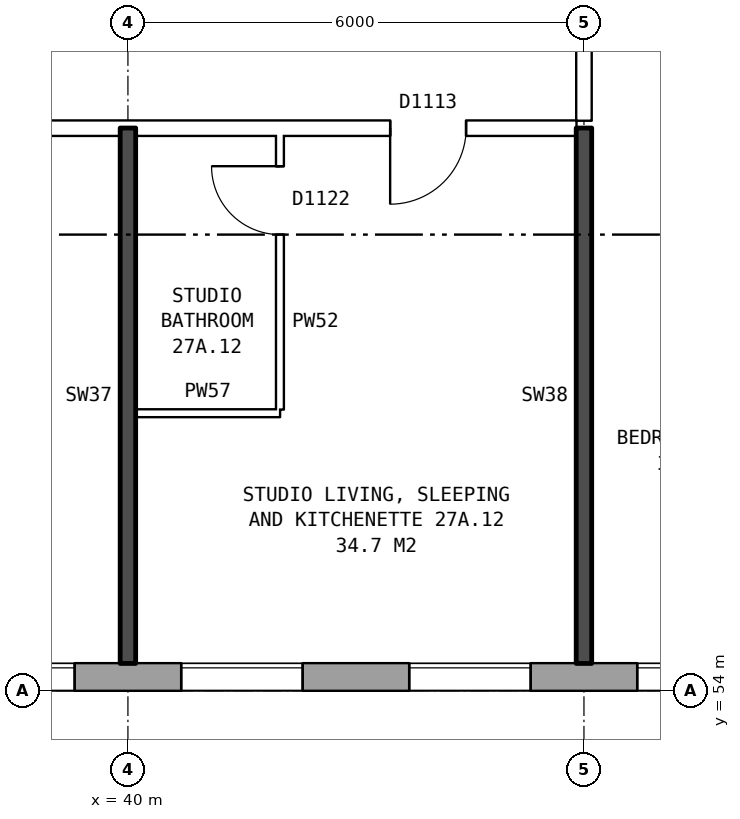
"""IFC4 building model, lengths in metres.
Left out: names, types, materials, properties, quantities, classifications, styles, units other than length and angle.
Written with IfcOpenShell. Run it as: python <this file> out.ifc"""

import sys

from ifc_helpers import new_model, si_unit, direction, frame, frame_2d, origin, place, context, subcontext, project, spatial, rectangle, extrude, element, fill, save


model = new_model("IFC4")
c1 = context("Model", 3, precision=1e-05, world=origin(), true_north=direction((0.0, 1.0)))
c2 = subcontext(c1, "Body", "Model", "MODEL_VIEW")
j1 = project(units=[si_unit("LENGTHUNIT", "METRE"), si_unit("PLANEANGLEUNIT", "RADIAN")], contexts=[c1])
p1 = place(None, origin())
s1 = spatial("IfcSite", under=j1, at=p1, CompositionType="ELEMENT")
p2 = place(p1, origin())
s2 = spatial("IfcBuilding", under=s1, at=p2, CompositionType="ELEMENT")
p3 = place(p2, frame((0.0, 0.0, 99.5)))
s3 = spatial("IfcBuildingStorey", under=s2, at=p3, CompositionType="ELEMENT", Elevation=99.5)
p4 = place(p3, frame((28.075, 54.18, 0.0), z_axis=(0.0, 0.0, 1.0), x_axis=(1.0, 0.0, 0.0)))
e1 = element("IfcWall", 1, at=p4, inside=s3, PredefinedType="STANDARD", context=c2, shape_type="SweptSolid", body=[
    extrude(rectangle(XDim=44.851, YDim=0.36, at=frame_2d((22.425, 0.0))), origin(), (0.0, 0.0, 1.0), 2.85),
])
p5 = place(p4, frame((0.625, 0.0, 0.8)))
e2 = element("IfcOpeningElement", 2, at=p5, cuts=e1, PredefinedType="OPENING", context=c2, shape_type="SweptSolid", body=[
    extrude(rectangle(XDim=1.6, YDim=1.8, at=frame_2d((0.8, 0.9))), frame((0.0, 0.19, 0.0), z_axis=(0.0, -1.0, 0.0), x_axis=(1.0, 0.0, 0.0)), (0.0, 0.0, 1.0), 0.38),
])
p6 = place(p4, frame((2.55, 0.0, 1.7)))
e3 = element("IfcOpeningElement", 3, at=p6, cuts=e1, PredefinedType="OPENING", context=c2, shape_type="SweptSolid", body=[
    extrude(rectangle(XDim=0.8, YDim=0.9, at=frame_2d((0.4, 0.45))), frame((0.0, 0.19, 0.0), z_axis=(0.0, -1.0, 0.0), x_axis=(1.0, 0.0, 0.0)), (0.0, 0.0, 1.0), 0.38),
])
p7 = place(p4, frame((6.625, 0.0, 0.8)))
e4 = element("IfcOpeningElement", 4, at=p7, cuts=e1, PredefinedType="OPENING", context=c2, shape_type="SweptSolid", body=[
    extrude(rectangle(XDim=1.6, YDim=1.8, at=frame_2d((0.8, 0.9))), frame((0.0, 0.19, 0.0), z_axis=(0.0, -1.0, 0.0), x_axis=(1.0, 0.0, 0.0)), (0.0, 0.0, 1.0), 0.38),
])
p8 = place(p4, frame((9.625, 0.0, 0.8)))
e5 = element("IfcOpeningElement", 5, at=p8, cuts=e1, PredefinedType="OPENING", context=c2, shape_type="SweptSolid", body=[
    extrude(rectangle(XDim=1.6, YDim=1.8, at=frame_2d((0.8, 0.9))), frame((0.0, 0.19, 0.0), z_axis=(0.0, -1.0, 0.0), x_axis=(1.0, 0.0, 0.0)), (0.0, 0.0, 1.0), 0.38),
])
p9 = place(p4, frame((12.625, 0.0, 0.8)))
e6 = element("IfcOpeningElement", 6, at=p9, cuts=e1, PredefinedType="OPENING", context=c2, shape_type="SweptSolid", body=[
    extrude(rectangle(XDim=1.6, YDim=1.8, at=frame_2d((0.8, 0.9))), frame((0.0, 0.19, 0.0), z_axis=(0.0, -1.0, 0.0), x_axis=(1.0, 0.0, 0.0)), (0.0, 0.0, 1.0), 0.38),
])
p10 = place(p4, frame((15.625, 0.0, 0.8)))
e7 = element("IfcOpeningElement", 7, at=p10, cuts=e1, PredefinedType="OPENING", context=c2, shape_type="SweptSolid", body=[
    extrude(rectangle(XDim=1.6, YDim=1.8, at=frame_2d((0.8, 0.9))), frame((0.0, 0.19, 0.0), z_axis=(0.0, -1.0, 0.0), x_axis=(1.0, 0.0, 0.0)), (0.0, 0.0, 1.0), 0.38),
])
p11 = place(p4, frame((18.625, 0.0, 0.8)))
e8 = element("IfcOpeningElement", 8, at=p11, cuts=e1, PredefinedType="OPENING", context=c2, shape_type="SweptSolid", body=[
    extrude(rectangle(XDim=1.6, YDim=1.8, at=frame_2d((0.8, 0.9))), frame((0.0, 0.19, 0.0), z_axis=(0.0, -1.0, 0.0), x_axis=(1.0, 0.0, 0.0)), (0.0, 0.0, 1.0), 0.38),
])
p12 = place(p4, frame((21.625, 0.0, 0.8)))
e9 = element("IfcOpeningElement", 9, at=p12, cuts=e1, PredefinedType="OPENING", context=c2, shape_type="SweptSolid", body=[
    extrude(rectangle(XDim=1.6, YDim=1.8, at=frame_2d((0.8, 0.9))), frame((0.0, 0.19, 0.0), z_axis=(0.0, -1.0, 0.0), x_axis=(1.0, 0.0, 0.0)), (0.0, 0.0, 1.0), 0.38),
])
p13 = place(p4, frame((24.625, 0.0, 0.8)))
e10 = element("IfcOpeningElement", 10, at=p13, cuts=e1, PredefinedType="OPENING", context=c2, shape_type="SweptSolid", body=[
    extrude(rectangle(XDim=1.6, YDim=1.8, at=frame_2d((0.8, 0.9))), frame((0.0, 0.19, 0.0), z_axis=(0.0, -1.0, 0.0), x_axis=(1.0, 0.0, 0.0)), (0.0, 0.0, 1.0), 0.38),
])
p14 = place(p4, frame((27.625, 0.0, 0.8)))
e11 = element("IfcOpeningElement", 11, at=p14, cuts=e1, PredefinedType="OPENING", context=c2, shape_type="SweptSolid", body=[
    extrude(rectangle(XDim=1.6, YDim=1.8, at=frame_2d((0.8, 0.9))), frame((0.0, 0.19, 0.0), z_axis=(0.0, -1.0, 0.0), x_axis=(1.0, 0.0, 0.0)), (0.0, 0.0, 1.0), 0.38),
])
p15 = place(p4, frame((30.625, 0.0, 0.8)))
e12 = element("IfcOpeningElement", 12, at=p15, cuts=e1, PredefinedType="OPENING", context=c2, shape_type="SweptSolid", body=[
    extrude(rectangle(XDim=1.6, YDim=1.8, at=frame_2d((0.8, 0.9))), frame((0.0, 0.19, 0.0), z_axis=(0.0, -1.0, 0.0), x_axis=(1.0, 0.0, 0.0)), (0.0, 0.0, 1.0), 0.38),
])
p16 = place(p4, frame((33.625, 0.0, 0.8)))
e13 = element("IfcOpeningElement", 13, at=p16, cuts=e1, PredefinedType="OPENING", context=c2, shape_type="SweptSolid", body=[
    extrude(rectangle(XDim=1.6, YDim=1.8, at=frame_2d((0.8, 0.9))), frame((0.0, 0.19, 0.0), z_axis=(0.0, -1.0, 0.0), x_axis=(1.0, 0.0, 0.0)), (0.0, 0.0, 1.0), 0.38),
])
p17 = place(p4, frame((36.625, 0.0, 0.8)))
e14 = element("IfcOpeningElement", 14, at=p17, cuts=e1, PredefinedType="OPENING", context=c2, shape_type="SweptSolid", body=[
    extrude(rectangle(XDim=1.6, YDim=1.8, at=frame_2d((0.8, 0.9))), frame((0.0, 0.19, 0.0), z_axis=(0.0, -1.0, 0.0), x_axis=(1.0, 0.0, 0.0)), (0.0, 0.0, 1.0), 0.38),
])
p18 = place(p4, frame((38.525, 0.0, 0.8)))
e15 = element("IfcOpeningElement", 15, at=p18, cuts=e1, PredefinedType="OPENING", context=c2, shape_type="SweptSolid", body=[
    extrude(rectangle(XDim=1.2, YDim=1.2, at=frame_2d((0.6, 0.6))), frame((0.0, 0.19, 0.0), z_axis=(0.0, -1.0, 0.0), x_axis=(1.0, 0.0, 0.0)), (0.0, 0.0, 1.0), 0.38),
])
p19 = place(p4, frame((42.625, 0.0, 0.8)))
e16 = element("IfcOpeningElement", 16, at=p19, cuts=e1, PredefinedType="OPENING", context=c2, shape_type="SweptSolid", body=[
    extrude(rectangle(XDim=1.6, YDim=1.8, at=frame_2d((0.8, 0.9))), frame((0.0, 0.19, 0.0), z_axis=(0.0, -1.0, 0.0), x_axis=(1.0, 0.0, 0.0)), (0.0, 0.0, 1.0), 0.38),
])
p20 = place(p4, frame((4.65, 0.0, 0.8)))
e17 = element("IfcOpeningElement", 17, at=p20, cuts=e1, PredefinedType="OPENING", context=c2, shape_type="SweptSolid", body=[
    extrude(rectangle(XDim=1.0, YDim=0.9, at=frame_2d((0.5, 0.45))), frame((0.0, 0.19, 0.0), z_axis=(0.0, -1.0, 0.0), x_axis=(1.0, 0.0, 0.0)), (0.0, 0.0, 1.0), 0.38),
])
p21 = place(p3, frame((40.1, 57.65, 0.0), z_axis=(0.0, 0.0, 1.0), x_axis=(1.0, 0.0, 0.0)))
e18 = element("IfcWall", 18, at=p21, inside=s3, PredefinedType="PARTITIONING", context=c2, shape_type="SweptSolid", body=[
    extrude(rectangle(XDim=1.9, YDim=0.1, at=frame_2d((0.95, 0.0))), origin(), (0.0, 0.0, 1.0), 2.85),
])
p22 = place(p3, frame((25.36, 61.4, 0.0), z_axis=(0.0, 0.0, 1.0), x_axis=(1.0, 0.0, 0.0)))
e19 = element("IfcWall", 19, at=p22, inside=s3, PredefinedType="PARTITIONING", context=c2, shape_type="SweptSolid", body=[
    extrude(rectangle(XDim=20.54, YDim=0.2, at=frame_2d((10.27, 0.0))), origin(), (0.0, 0.0, 1.0), 2.85),
])
p23 = place(p22, frame((18.09, 0.0, 0.0)))
e20 = element("IfcOpeningElement", 20, at=p23, cuts=e19, PredefinedType="OPENING", context=c2, shape_type="SweptSolid", body=[
    extrude(rectangle(XDim=1.0, YDim=2.1, at=frame_2d((0.5, 1.05))), frame((0.0, 0.11, 0.0), z_axis=(0.0, -1.0, 0.0), x_axis=(1.0, 0.0, 0.0)), (0.0, 0.0, 1.0), 0.22),
])
p24 = place(p22, frame((12.14, 0.0, 0.0)))
e21 = element("IfcOpeningElement", 21, at=p24, cuts=e19, PredefinedType="OPENING", context=c2, shape_type="SweptSolid", body=[
    extrude(rectangle(XDim=1.0, YDim=2.1, at=frame_2d((0.5, 1.05))), frame((0.0, 0.11, 0.0), z_axis=(0.0, -1.0, 0.0), x_axis=(1.0, 0.0, 0.0)), (0.0, 0.0, 1.0), 0.22),
])
p25 = place(p22, frame((2.62, 0.0, 0.0)))
e22 = element("IfcOpeningElement", 22, at=p25, cuts=e19, PredefinedType="OPENING", context=c2, shape_type="SweptSolid", body=[
    extrude(rectangle(XDim=1.0, YDim=2.1, at=frame_2d((0.5, 1.05))), frame((0.0, 0.11, 0.0), z_axis=(0.0, -1.0, 0.0), x_axis=(1.0, 0.0, 0.0)), (0.0, 0.0, 1.0), 0.22),
])
p26 = place(p3, frame((40.0, 54.36, 0.0), z_axis=(0.0, 0.0, 1.0), x_axis=(0.0, 1.0, 0.0)))
e23 = element("IfcWall", 23, at=p26, inside=s3, PredefinedType="SOLIDWALL", context=c2, shape_type="SweptSolid", body=[
    extrude(rectangle(XDim=7.04, YDim=0.2, at=frame_2d((3.52, 0.0))), origin(), (0.0, 0.0, 1.0), 2.85),
])
p27 = place(p3, frame((42.0, 57.7, 0.0), z_axis=(0.0, 0.0, 1.0), x_axis=(0.0, 1.0, 0.0)))
e24 = element("IfcWall", 24, at=p27, inside=s3, PredefinedType="PARTITIONING", context=c2, shape_type="SweptSolid", body=[
    extrude(rectangle(XDim=3.6, YDim=0.1, at=frame_2d((1.8, 0.0))), origin(), (0.0, 0.0, 1.0), 2.85),
])
p28 = place(p27, frame((2.3, 0.0, 0.0)))
e25 = element("IfcOpeningElement", 25, at=p28, cuts=e24, PredefinedType="OPENING", context=c2, shape_type="SweptSolid", body=[
    extrude(rectangle(XDim=0.9, YDim=2.1, at=frame_2d((0.45, 1.05))), frame((0.0, 0.06, 0.0), z_axis=(0.0, -1.0, 0.0), x_axis=(1.0, 0.0, 0.0)), (0.0, 0.0, 1.0), 0.12),
])
p29 = place(p3, frame((46.0, 54.36, 0.0), z_axis=(0.0, 0.0, 1.0), x_axis=(0.0, 1.0, 0.0)))
e26 = element("IfcWall", 26, at=p29, inside=s3, PredefinedType="SOLIDWALL", context=c2, shape_type="SweptSolid", body=[
    extrude(rectangle(XDim=7.04, YDim=0.2, at=frame_2d((3.52, 0.0))), origin(), (0.0, 0.0, 1.0), 2.85),
])
p30 = place(p3, frame((46.0, 61.5, 0.0), z_axis=(0.0, 0.0, 1.0), x_axis=(0.0, 1.0, 0.0)))
e27 = element("IfcWall", 27, at=p30, inside=s3, PredefinedType="PARTITIONING", context=c2, shape_type="SweptSolid", body=[
    extrude(rectangle(XDim=2.2, YDim=0.2, at=frame_2d((1.1, 0.0))), origin(), (0.0, 0.0, 1.0), 2.85),
])
p31 = place(p8, origin())
e28 = element("IfcWindow", 28, at=p31, inside=s3, PartitioningType="SINGLE_PANEL", PredefinedType="WINDOW", context=c2, shape_type="SweptSolid", body=[
    extrude(rectangle(XDim=1.6, YDim=1.8, at=frame_2d((0.8, 0.9))), frame((0.0, 0.15, 0.0), z_axis=(0.0, -1.0, 0.0), x_axis=(1.0, 0.0, 0.0)), (0.0, 0.0, 1.0), 0.06),
])
fill(e5, e28)
p32 = place(p9, origin())
e29 = element("IfcWindow", 29, at=p32, inside=s3, PartitioningType="SINGLE_PANEL", PredefinedType="WINDOW", context=c2, shape_type="SweptSolid", body=[
    extrude(rectangle(XDim=1.6, YDim=1.8, at=frame_2d((0.8, 0.9))), frame((0.0, 0.15, 0.0), z_axis=(0.0, -1.0, 0.0), x_axis=(1.0, 0.0, 0.0)), (0.0, 0.0, 1.0), 0.06),
])
fill(e6, e29)
p33 = place(p10, origin())
e30 = element("IfcWindow", 30, at=p33, inside=s3, PartitioningType="SINGLE_PANEL", PredefinedType="WINDOW", context=c2, shape_type="SweptSolid", body=[
    extrude(rectangle(XDim=1.6, YDim=1.8, at=frame_2d((0.8, 0.9))), frame((0.0, 0.15, 0.0), z_axis=(0.0, -1.0, 0.0), x_axis=(1.0, 0.0, 0.0)), (0.0, 0.0, 1.0), 0.06),
])
fill(e7, e30)
p34 = place(p11, origin())
e31 = element("IfcWindow", 31, at=p34, inside=s3, PartitioningType="SINGLE_PANEL", PredefinedType="WINDOW", context=c2, shape_type="SweptSolid", body=[
    extrude(rectangle(XDim=1.6, YDim=1.8, at=frame_2d((0.8, 0.9))), frame((0.0, 0.15, 0.0), z_axis=(0.0, -1.0, 0.0), x_axis=(1.0, 0.0, 0.0)), (0.0, 0.0, 1.0), 0.06),
])
fill(e8, e31)
p35 = place(p23, frame((1.0, 0.0, 0.0), z_axis=(0.0, 0.0, 1.0), x_axis=(-1.0, 0.0, 0.0)))
e32 = element("IfcDoor", 32, at=p35, inside=s3, OperationType="SINGLE_SWING_RIGHT", PredefinedType="DOOR", context=c2, shape_type="SweptSolid", body=[
    extrude(rectangle(XDim=1.0, YDim=2.1, at=frame_2d((0.5, 1.05))), frame((0.0, 0.025, 0.0), z_axis=(0.0, -1.0, 0.0), x_axis=(1.0, 0.0, 0.0)), (0.0, 0.0, 1.0), 0.05),
])
fill(e20, e32)
p36 = place(p28, origin())
e33 = element("IfcDoor", 33, at=p36, inside=s3, OperationType="SINGLE_SWING_RIGHT", PredefinedType="DOOR", context=c2, shape_type="SweptSolid", body=[
    extrude(rectangle(XDim=0.9, YDim=2.1, at=frame_2d((0.45, 1.05))), frame((0.0, 0.025, 0.0), z_axis=(0.0, -1.0, 0.0), x_axis=(1.0, 0.0, 0.0)), (0.0, 0.0, 1.0), 0.05),
])
fill(e25, e33)
save(model, sys.argv[1])
